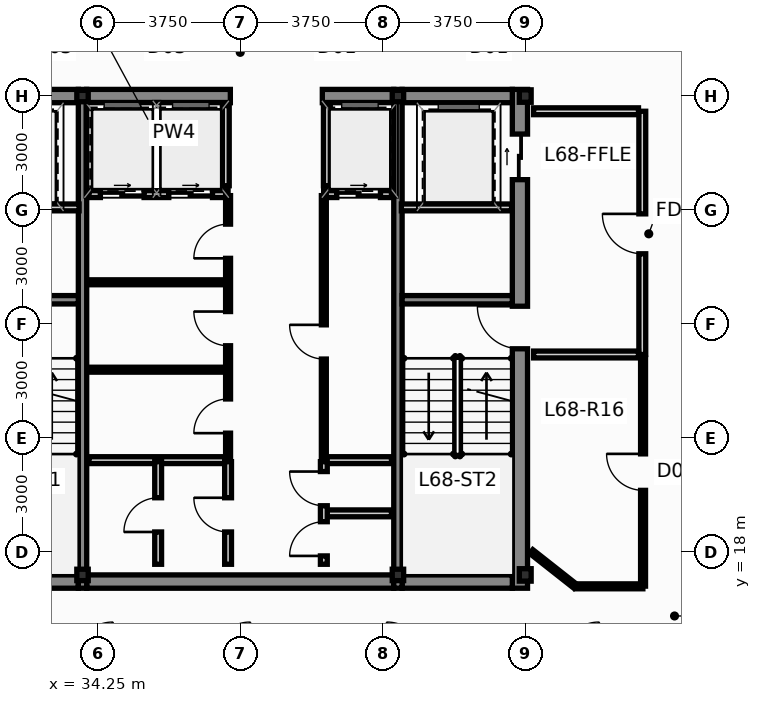
"""IFC4 building model, lengths in metres.
Left out: names, types, materials, properties, quantities, classifications, styles, units other than length and angle.
Written with IfcOpenShell. Run it as: python <this file> out.ifc"""

import sys

from ifc_helpers import new_model, si_unit, direction, frame, frame_2d, origin, origin_2d, place, context, subcontext, project, spatial, rectangle, hollow_rectangle, i_section, extrude, source, transform, mapped, element, fill, save


model = new_model("IFC4")
c1 = context("Model", 3, precision=1e-05, world=origin(), true_north=direction((0.0, 1.0)))
c2 = subcontext(c1, "Body", "Model", "MODEL_VIEW")
j1 = project(units=[si_unit("LENGTHUNIT", "METRE"), si_unit("PLANEANGLEUNIT", "RADIAN")], contexts=[c1])
p1 = place(None, origin())
s1 = spatial("IfcSite", under=j1, at=p1, CompositionType="ELEMENT")
p2 = place(p1, origin())
s2 = spatial("IfcBuilding", under=s1, at=p2, CompositionType="ELEMENT")
p3 = place(p2, frame((0.0, 0.0, 259.05)))
s3 = spatial("IfcBuildingStorey", under=s2, at=p3, CompositionType="ELEMENT", Elevation=259.05)
m1 = source(origin(), c2, "Body", "SweptSolid", [
    extrude(i_section(OverallWidth=0.311, OverallDepth=0.327, WebThickness=0.016, FlangeThickness=0.025, at=origin_2d()), origin(), (0.0, 0.0, 1.0), 3.65),
])
for number, where, z_axis, x_axis in (
    (1, (45.5, 17.4, 0.0), (0.0, 0.0, 1.0), (1.0, 0.0, 0.0)),
    (2, (45.5, 30.0, 0.0), (0.0, 0.0, 1.0), (1.0, 0.0, 0.0)),
):
    element("IfcColumn", number, at=place(p3, frame(where, z_axis=z_axis, x_axis=x_axis)), inside=s3, PredefinedType="COLUMN", context=c2, shape_type="MappedRepresentation", body=[
        mapped(m1, transform((0.0, 0.0, 0.0), scale=1.0)),
    ])
m2 = source(origin(), c2, "Body", "SweptSolid", [
    extrude(hollow_rectangle(XDim=0.3, YDim=0.3, WallThickness=0.012, at=origin_2d()), origin(), (0.0, 0.0, 1.0), 3.65),
])
for number, where, z_axis, x_axis in (
    (3, (33.85, 17.4, 0.0), (0.0, 0.0, 1.0), (1.0, 0.0, 0.0)),
    (4, (42.15, 17.4, 0.0), (0.0, 0.0, 1.0), (1.0, 0.0, 0.0)),
    (5, (33.85, 30.0, 0.0), (0.0, 0.0, 1.0), (1.0, 0.0, 0.0)),
    (6, (42.15, 30.0, 0.0), (0.0, 0.0, 1.0), (1.0, 0.0, 0.0)),
):
    element("IfcColumn", number, at=place(p3, frame(where, z_axis=z_axis, x_axis=x_axis)), inside=s3, PredefinedType="COLUMN", context=c2, shape_type="MappedRepresentation", body=[
        mapped(m2, transform((0.0, 0.0, 0.0), scale=1.0)),
    ])
p4 = place(p3, frame((45.36, 17.05, 0.0), z_axis=(0.0, 0.0, 1.0), x_axis=(0.0, 1.0, 0.0)))
e7 = element("IfcWall", 7, at=p4, inside=s3, PredefinedType="SHEAR", context=c2, shape_type="SweptSolid", body=[
    extrude(rectangle(XDim=13.125, YDim=0.4, at=frame_2d((6.562, 0.0))), origin(), (0.0, 0.0, 1.0), 3.65),
])
p5 = place(p4, frame((6.3, 0.0, 0.0)))
e8 = element("IfcOpeningElement", 8, at=p5, cuts=e7, PredefinedType="OPENING", context=c2, shape_type="SweptSolid", body=[
    extrude(rectangle(XDim=1.12, YDim=2.15, at=frame_2d((0.56, 1.075))), frame((0.0, 0.212, 0.0), z_axis=(0.0, -1.0, 0.0), x_axis=(1.0, 0.0, 0.0)), (0.0, 0.0, 1.0), 0.424),
])
p6 = place(p4, frame((10.75, 0.0, 0.0)))
e9 = element("IfcOpeningElement", 9, at=p6, cuts=e7, PredefinedType="OPENING", context=c2, shape_type="SweptSolid", body=[
    extrude(rectangle(XDim=1.2, YDim=2.2, at=frame_2d((0.6, 1.1))), frame((0.0, 0.212, 0.0), z_axis=(0.0, -1.0, 0.0), x_axis=(1.0, 0.0, 0.0)), (0.0, 0.0, 1.0), 0.424),
])
p7 = place(p3, frame((30.84, 17.225, 0.0), z_axis=(0.0, 0.0, 1.0), x_axis=(1.0, 0.0, 0.0)))
e10 = element("IfcWall", 10, at=p7, inside=s3, PredefinedType="SHEAR", context=c2, shape_type="SweptSolid", body=[
    extrude(rectangle(XDim=2.9, YDim=0.35, at=frame_2d((1.45, 0.0))), origin(), (0.0, 0.0, 1.0), 3.65),
])
p8 = place(p3, frame((33.96, 17.225, 0.0), z_axis=(0.0, 0.0, 1.0), x_axis=(1.0, 0.0, 0.0)))
e11 = element("IfcWall", 11, at=p8, inside=s3, PredefinedType="SHEAR", context=c2, shape_type="SweptSolid", body=[
    extrude(rectangle(XDim=8.08, YDim=0.35, at=frame_2d((4.04, 0.0))), origin(), (0.0, 0.0, 1.0), 3.65),
])
for number, where, z_axis, x_axis in (
    (12, (42.26, 17.225, 0.0), (0.0, 0.0, 1.0), (1.0, 0.0, 0.0)),
    (13, (30.84, 30.0, 0.0), (0.0, 0.0, 1.0), (1.0, 0.0, 0.0)),
):
    element("IfcWall", number, at=place(p3, frame(where, z_axis=z_axis, x_axis=x_axis)), inside=s3, PredefinedType="SHEAR", context=c2, shape_type="SweptSolid", body=[
        extrude(rectangle(XDim=2.9, YDim=0.35, at=frame_2d((1.45, 0.0))), origin(), (0.0, 0.0, 1.0), 3.65),
    ])
p9 = place(p3, frame((33.96, 30.0, 0.0), z_axis=(0.0, 0.0, 1.0), x_axis=(1.0, 0.0, 0.0)))
e14 = element("IfcWall", 14, at=p9, inside=s3, PredefinedType="SHEAR", context=c2, shape_type="SweptSolid", body=[
    extrude(rectangle(XDim=3.78, YDim=0.35, at=frame_2d((1.89, 0.0))), origin(), (0.0, 0.0, 1.0), 3.65),
])
p10 = place(p3, frame((40.16, 30.0, 0.0), z_axis=(0.0, 0.0, 1.0), x_axis=(1.0, 0.0, 0.0)))
e15 = element("IfcWall", 15, at=p10, inside=s3, PredefinedType="SHEAR", context=c2, shape_type="SweptSolid", body=[
    extrude(rectangle(XDim=1.88, YDim=0.35, at=frame_2d((0.94, 0.0))), origin(), (0.0, 0.0, 1.0), 3.65),
])
p11 = place(p3, frame((42.26, 30.0, 0.0), z_axis=(0.0, 0.0, 1.0), x_axis=(1.0, 0.0, 0.0)))
e16 = element("IfcWall", 16, at=p11, inside=s3, PredefinedType="SHEAR", context=c2, shape_type="SweptSolid", body=[
    extrude(rectangle(XDim=2.9, YDim=0.35, at=frame_2d((1.45, 0.0))), origin(), (0.0, 0.0, 1.0), 3.65),
])
for number, where, z_axis, x_axis in (
    (17, (33.85, 17.05, 0.0), (0.0, 0.0, 1.0), (0.0, 1.0, 0.0)),
    (18, (42.15, 17.05, 0.0), (0.0, 0.0, 1.0), (0.0, 1.0, 0.0)),
):
    element("IfcWall", number, at=place(p3, frame(where, z_axis=z_axis, x_axis=x_axis)), inside=s3, PredefinedType="SHEAR", context=c2, shape_type="SweptSolid", body=[
        extrude(rectangle(XDim=13.125, YDim=0.22, at=frame_2d((6.562, 0.0))), origin(), (0.0, 0.0, 1.0), 3.65),
    ])
for number, where, z_axis, x_axis in (
    (19, (30.84, 24.64, 0.0), (0.0, 0.0, 1.0), (1.0, 0.0, 0.0)),
    (20, (42.26, 24.64, 0.0), (0.0, 0.0, 1.0), (1.0, 0.0, 0.0)),
):
    element("IfcWall", number, at=place(p3, frame(where, z_axis=z_axis, x_axis=x_axis)), inside=s3, PredefinedType="SHEAR", context=c2, shape_type="SweptSolid", body=[
        extrude(rectangle(XDim=2.9, YDim=0.22, at=frame_2d((1.45, 0.0))), origin(), (0.0, 0.0, 1.0), 3.65),
    ])
p12 = place(p3, frame((34.02, 27.42, 0.0), z_axis=(0.0, 0.0, 1.0), x_axis=(1.0, 0.0, 0.0)))
e21 = element("IfcWall", 21, at=p12, inside=s3, PredefinedType="PARTITIONING", context=c2, shape_type="SweptSolid", body=[
    extrude(rectangle(XDim=3.66, YDim=0.18, at=frame_2d((1.83, 0.0))), origin(), (0.0, 0.0, 1.0), 3.4),
])
p13 = place(p12, frame((0.3, 0.0, 0.0)))
e22 = element("IfcOpeningElement", 22, at=p13, cuts=e21, PredefinedType="OPENING", context=c2, shape_type="SweptSolid", body=[
    extrude(rectangle(XDim=1.15, YDim=2.2, at=frame_2d((0.575, 1.1))), frame((0.0, 0.102, 0.0), z_axis=(0.0, -1.0, 0.0), x_axis=(1.0, 0.0, 0.0)), (0.0, 0.0, 1.0), 0.204),
])
p14 = place(p12, frame((2.1, 0.0, 0.0)))
e23 = element("IfcOpeningElement", 23, at=p14, cuts=e21, PredefinedType="OPENING", context=c2, shape_type="SweptSolid", body=[
    extrude(rectangle(XDim=1.15, YDim=2.2, at=frame_2d((0.575, 1.1))), frame((0.0, 0.102, 0.0), z_axis=(0.0, -1.0, 0.0), x_axis=(1.0, 0.0, 0.0)), (0.0, 0.0, 1.0), 0.204),
])
p15 = place(p3, frame((40.22, 27.42, 0.0), z_axis=(0.0, 0.0, 1.0), x_axis=(1.0, 0.0, 0.0)))
e24 = element("IfcWall", 24, at=p15, inside=s3, PredefinedType="PARTITIONING", context=c2, shape_type="SweptSolid", body=[
    extrude(rectangle(XDim=1.76, YDim=0.18, at=frame_2d((0.88, 0.0))), origin(), (0.0, 0.0, 1.0), 3.4),
])
p16 = place(p15, frame((0.32, 0.0, 0.0)))
e25 = element("IfcOpeningElement", 25, at=p16, cuts=e24, PredefinedType="OPENING", context=c2, shape_type="SweptSolid", body=[
    extrude(rectangle(XDim=1.15, YDim=2.2, at=frame_2d((0.575, 1.1))), frame((0.0, 0.102, 0.0), z_axis=(0.0, -1.0, 0.0), x_axis=(1.0, 0.0, 0.0)), (0.0, 0.0, 1.0), 0.204),
])
for number, where, z_axis, x_axis in (
    (26, (37.62, 27.64, 0.0), (0.0, 0.0, 1.0), (0.0, 1.0, 0.0)),
    (27, (40.28, 27.64, 0.0), (0.0, 0.0, 1.0), (0.0, 1.0, 0.0)),
):
    element("IfcWall", number, at=place(p3, frame(where, z_axis=z_axis, x_axis=x_axis)), inside=s3, PredefinedType="PARTITIONING", context=c2, shape_type="SweptSolid", body=[
        extrude(rectangle(XDim=2.11, YDim=0.18, at=frame_2d((1.055, 0.0))), origin(), (0.0, 0.0, 1.0), 3.4),
    ])
p17 = place(p3, frame((48.58, 23.2, 0.0), z_axis=(0.0, 0.0, 1.0), x_axis=(0.0, 1.0, 0.0)))
e28 = element("IfcWall", 28, at=p17, inside=s3, PredefinedType="PARTITIONING", context=c2, shape_type="SweptSolid", body=[
    extrude(rectangle(XDim=6.4, YDim=0.18, at=frame_2d((3.2, 0.0))), origin(), (0.0, 0.0, 1.0), 3.129),
])
p18 = place(p17, frame((2.65, 0.0, 0.0)))
e29 = element("IfcOpeningElement", 29, at=p18, cuts=e28, PredefinedType="OPENING", context=c2, shape_type="SweptSolid", body=[
    extrude(rectangle(XDim=1.05, YDim=2.15, at=frame_2d((0.525, 1.075))), frame((0.0, 0.102, 0.0), z_axis=(0.0, -1.0, 0.0), x_axis=(1.0, 0.0, 0.0)), (0.0, 0.0, 1.0), 0.204),
])
for number, where, z_axis, x_axis in (
    (30, (45.72, 23.2, 0.0), (0.0, 0.0, 1.0), (1.0, 0.0, 0.0)),
    (31, (45.72, 29.6, 0.0), (0.0, 0.0, 1.0), (1.0, 0.0, 0.0)),
):
    element("IfcWall", number, at=place(p3, frame(where, z_axis=z_axis, x_axis=x_axis)), inside=s3, PredefinedType="PARTITIONING", context=c2, shape_type="SweptSolid", body=[
        extrude(rectangle(XDim=2.76, YDim=0.18, at=frame_2d((1.38, 0.0))), origin(), (0.0, 0.0, 1.0), 3.4),
    ])
for number, where, z_axis, x_axis in (
    (32, (30.86, 27.07, 0.0), (0.0, 0.0, 1.0), (1.0, 0.0, 0.0)),
    (33, (42.24, 27.07, 0.0), (0.0, 0.0, 1.0), (1.0, 0.0, 0.0)),
):
    element("IfcWall", number, at=place(p3, frame(where, z_axis=z_axis, x_axis=x_axis)), inside=s3, PredefinedType="PARTITIONING", context=c2, shape_type="SweptSolid", body=[
        extrude(rectangle(XDim=2.9, YDim=0.18, at=frame_2d((1.45, 0.0))), origin(), (0.0, 0.0, 1.0), 3.4),
    ])
p19 = place(p3, frame((34.02, 20.42, 0.0), z_axis=(0.0, 0.0, 1.0), x_axis=(1.0, 0.0, 0.0)))
e34 = element("IfcWall", 34, at=p19, inside=s3, PredefinedType="PARTITIONING", context=c2, shape_type="SweptSolid", body=[
    extrude(rectangle(XDim=3.64, YDim=0.18, at=frame_2d((1.82, 0.0))), origin(), (0.0, 0.0, 1.0), 3.4),
])
p20 = place(p3, frame((40.22, 20.42, 0.0), z_axis=(0.0, 0.0, 1.0), x_axis=(1.0, 0.0, 0.0)))
e35 = element("IfcWall", 35, at=p20, inside=s3, PredefinedType="PARTITIONING", context=c2, shape_type="SweptSolid", body=[
    extrude(rectangle(XDim=1.76, YDim=0.18, at=frame_2d((0.88, 0.0))), origin(), (0.0, 0.0, 1.0), 3.4),
])
for number, where, z_axis, x_axis in (
    (36, (34.02, 22.8, 0.0), (0.0, 0.0, 1.0), (1.0, 0.0, 0.0)),
    (37, (34.02, 25.1, 0.0), (0.0, 0.0, 1.0), (1.0, 0.0, 0.0)),
):
    element("IfcWall", number, at=place(p3, frame(where, z_axis=z_axis, x_axis=x_axis)), inside=s3, PredefinedType="PARTITIONING", context=c2, shape_type="SweptSolid", body=[
        extrude(rectangle(XDim=3.58, YDim=0.13, at=frame_2d((1.79, 0.0))), origin(), (0.0, 0.0, 1.0), 3.4),
    ])
p21 = place(p3, frame((37.68, 20.48, 0.0), z_axis=(0.0, 0.0, 1.0), x_axis=(0.0, 1.0, 0.0)))
e38 = element("IfcWall", 38, at=p21, inside=s3, PredefinedType="PARTITIONING", context=c2, shape_type="SweptSolid", body=[
    extrude(rectangle(XDim=6.9, YDim=0.13, at=frame_2d((3.45, 0.0))), origin(), (0.0, 0.0, 1.0), 3.4),
])
p22 = place(p21, frame((0.65, 0.0, 0.0)))
e39 = element("IfcOpeningElement", 39, at=p22, cuts=e38, PredefinedType="OPENING", context=c2, shape_type="SweptSolid", body=[
    extrude(rectangle(XDim=0.9, YDim=2.1, at=frame_2d((0.45, 1.05))), frame((0.0, 0.077, 0.0), z_axis=(0.0, -1.0, 0.0), x_axis=(1.0, 0.0, 0.0)), (0.0, 0.0, 1.0), 0.154),
])
p23 = place(p21, frame((2.95, 0.0, 0.0)))
e40 = element("IfcOpeningElement", 40, at=p23, cuts=e38, PredefinedType="OPENING", context=c2, shape_type="SweptSolid", body=[
    extrude(rectangle(XDim=0.9, YDim=2.1, at=frame_2d((0.45, 1.05))), frame((0.0, 0.077, 0.0), z_axis=(0.0, -1.0, 0.0), x_axis=(1.0, 0.0, 0.0)), (0.0, 0.0, 1.0), 0.154),
])
p24 = place(p21, frame((5.25, 0.0, 0.0)))
e41 = element("IfcOpeningElement", 41, at=p24, cuts=e38, PredefinedType="OPENING", context=c2, shape_type="SweptSolid", body=[
    extrude(rectangle(XDim=0.9, YDim=2.1, at=frame_2d((0.45, 1.05))), frame((0.0, 0.077, 0.0), z_axis=(0.0, -1.0, 0.0), x_axis=(1.0, 0.0, 0.0)), (0.0, 0.0, 1.0), 0.154),
])
p25 = place(p3, frame((40.2, 20.48, 0.0), z_axis=(0.0, 0.0, 1.0), x_axis=(0.0, 1.0, 0.0)))
e42 = element("IfcWall", 42, at=p25, inside=s3, PredefinedType="PARTITIONING", context=c2, shape_type="SweptSolid", body=[
    extrude(rectangle(XDim=6.9, YDim=0.13, at=frame_2d((3.45, 0.0))), origin(), (0.0, 0.0, 1.0), 3.4),
])
p26 = place(p25, frame((2.6, 0.0, 0.0)))
e43 = element("IfcOpeningElement", 43, at=p26, cuts=e42, PredefinedType="OPENING", context=c2, shape_type="SweptSolid", body=[
    extrude(rectangle(XDim=0.9, YDim=2.1, at=frame_2d((0.45, 1.05))), frame((0.0, 0.077, 0.0), z_axis=(0.0, -1.0, 0.0), x_axis=(1.0, 0.0, 0.0)), (0.0, 0.0, 1.0), 0.154),
])
p27 = place(p3, frame((35.84, 17.68, 0.0), z_axis=(0.0, 0.0, 1.0), x_axis=(0.0, 1.0, 0.0)))
e44 = element("IfcWall", 44, at=p27, inside=s3, PredefinedType="PARTITIONING", context=c2, shape_type="SweptSolid", body=[
    extrude(rectangle(XDim=2.7, YDim=0.18, at=frame_2d((1.35, 0.0))), origin(), (0.0, 0.0, 1.0), 3.4),
])
p28 = place(p27, frame((0.85, 0.0, 0.0)))
e45 = element("IfcOpeningElement", 45, at=p28, cuts=e44, PredefinedType="OPENING", context=c2, shape_type="SweptSolid", body=[
    extrude(rectangle(XDim=0.9, YDim=2.1, at=frame_2d((0.45, 1.05))), frame((0.0, 0.102, 0.0), z_axis=(0.0, -1.0, 0.0), x_axis=(1.0, 0.0, 0.0)), (0.0, 0.0, 1.0), 0.204),
])
p29 = place(p3, frame((37.68, 17.68, 0.0), z_axis=(0.0, 0.0, 1.0), x_axis=(0.0, 1.0, 0.0)))
e46 = element("IfcWall", 46, at=p29, inside=s3, PredefinedType="PARTITIONING", context=c2, shape_type="SweptSolid", body=[
    extrude(rectangle(XDim=2.7, YDim=0.18, at=frame_2d((1.35, 0.0))), origin(), (0.0, 0.0, 1.0), 3.4),
])
p30 = place(p29, frame((0.85, 0.0, 0.0)))
e47 = element("IfcOpeningElement", 47, at=p30, cuts=e46, PredefinedType="OPENING", context=c2, shape_type="SweptSolid", body=[
    extrude(rectangle(XDim=0.9, YDim=2.1, at=frame_2d((0.45, 1.05))), frame((0.0, 0.102, 0.0), z_axis=(0.0, -1.0, 0.0), x_axis=(1.0, 0.0, 0.0)), (0.0, 0.0, 1.0), 0.204),
])
p31 = place(p3, frame((40.28, 19.02, 0.0), z_axis=(0.0, 0.0, 1.0), x_axis=(1.0, 0.0, 0.0)))
e48 = element("IfcWall", 48, at=p31, inside=s3, PredefinedType="PARTITIONING", context=c2, shape_type="SweptSolid", body=[
    extrude(rectangle(XDim=1.7, YDim=0.18, at=frame_2d((0.85, 0.0))), origin(), (0.0, 0.0, 1.0), 3.4),
])
p32 = place(p3, frame((40.2, 17.68, 0.0), z_axis=(0.0, 0.0, 1.0), x_axis=(0.0, 1.0, 0.0)))
e49 = element("IfcWall", 49, at=p32, inside=s3, PredefinedType="PARTITIONING", context=c2, shape_type="SweptSolid", body=[
    extrude(rectangle(XDim=2.7, YDim=0.18, at=frame_2d((1.35, 0.0))), origin(), (0.0, 0.0, 1.0), 3.4),
])
p33 = place(p32, frame((0.22, 0.0, 0.0)))
e50 = element("IfcOpeningElement", 50, at=p33, cuts=e49, PredefinedType="OPENING", context=c2, shape_type="SweptSolid", body=[
    extrude(rectangle(XDim=0.9, YDim=2.1, at=frame_2d((0.45, 1.05))), frame((0.0, 0.102, 0.0), z_axis=(0.0, -1.0, 0.0), x_axis=(1.0, 0.0, 0.0)), (0.0, 0.0, 1.0), 0.204),
])
p34 = place(p32, frame((1.54, 0.0, 0.0)))
e51 = element("IfcOpeningElement", 51, at=p34, cuts=e49, PredefinedType="OPENING", context=c2, shape_type="SweptSolid", body=[
    extrude(rectangle(XDim=0.9, YDim=2.1, at=frame_2d((0.45, 1.05))), frame((0.0, 0.102, 0.0), z_axis=(0.0, -1.0, 0.0), x_axis=(1.0, 0.0, 0.0)), (0.0, 0.0, 1.0), 0.204),
])
p35 = place(p3, frame((48.6, 17.105, 0.0), z_axis=(0.0, 0.0, 1.0), x_axis=(0.0, 1.0, 0.0)))
e52 = element("IfcWall", 52, at=p35, inside=s3, PredefinedType="PARTITIONING", context=c2, shape_type="SweptSolid", body=[
    extrude(rectangle(XDim=6.0, YDim=0.13, at=frame_2d((3.0, 0.0))), origin(), (0.0, 0.0, 1.0), 3.129),
])
p36 = place(p35, frame((2.52, 0.0, 0.0)))
e53 = element("IfcOpeningElement", 53, at=p36, cuts=e52, PredefinedType="OPENING", context=c2, shape_type="SweptSolid", body=[
    extrude(rectangle(XDim=0.96, YDim=2.15, at=frame_2d((0.48, 1.075))), frame((0.0, 0.077, 0.0), z_axis=(0.0, -1.0, 0.0), x_axis=(1.0, 0.0, 0.0)), (0.0, 0.0, 1.0), 0.154),
])
p37 = place(p3, frame((46.825, 17.1, 0.0), z_axis=(0.0, 0.0, 1.0), x_axis=(1.0, 0.0, 0.0)))
e54 = element("IfcWall", 54, at=p37, inside=s3, PredefinedType="PARTITIONING", context=c2, shape_type="SweptSolid", body=[
    extrude(rectangle(XDim=1.77, YDim=0.13, at=frame_2d((0.885, 0.0))), origin(), (0.0, 0.0, 1.0), 2.985),
])
p38 = place(p3, frame((46.816, 17.103, 0.0), z_axis=(0.0, 0.0, 1.0), x_axis=(-0.785713874632, 0.618590096276, 0.0)))
e55 = element("IfcWall", 55, at=p38, inside=s3, PredefinedType="PARTITIONING", context=c2, shape_type="SweptSolid", body=[
    extrude(rectangle(XDim=1.472, YDim=0.13, at=frame_2d((0.736, 0.0))), origin(), (0.0, 0.0, 1.0), 3.4),
])
p39 = place(p5, origin())
e56 = element("IfcDoor", 56, at=p39, inside=s3, OperationType="SINGLE_SWING_RIGHT", PredefinedType="DOOR", context=c2, shape_type="SweptSolid", body=[
    extrude(rectangle(XDim=1.12, YDim=2.15, at=frame_2d((0.56, 1.075))), frame((0.0, 0.025, 0.0), z_axis=(0.0, -1.0, 0.0), x_axis=(1.0, 0.0, 0.0)), (0.0, 0.0, 1.0), 0.05),
])
fill(e8, e56)
p40 = place(p6, origin())
e57 = element("IfcDoor", 57, at=p40, inside=s3, OperationType="SLIDING_TO_RIGHT", PredefinedType="DOOR", context=c2, shape_type="SweptSolid", body=[
    extrude(rectangle(XDim=1.2, YDim=2.2, at=frame_2d((0.6, 1.1))), frame((0.0, 0.025, 0.0), z_axis=(0.0, -1.0, 0.0), x_axis=(1.0, 0.0, 0.0)), (0.0, 0.0, 1.0), 0.05),
])
fill(e9, e57)
p41 = place(p13, origin())
e58 = element("IfcDoor", 58, at=p41, inside=s3, OperationType="SLIDING_TO_RIGHT", PredefinedType="DOOR", context=c2, shape_type="SweptSolid", body=[
    extrude(rectangle(XDim=1.15, YDim=2.2, at=frame_2d((0.575, 1.1))), frame((0.0, 0.025, 0.0), z_axis=(0.0, -1.0, 0.0), x_axis=(1.0, 0.0, 0.0)), (0.0, 0.0, 1.0), 0.05),
])
fill(e22, e58)
p42 = place(p14, origin())
e59 = element("IfcDoor", 59, at=p42, inside=s3, OperationType="SLIDING_TO_LEFT", PredefinedType="DOOR", context=c2, shape_type="SweptSolid", body=[
    extrude(rectangle(XDim=1.15, YDim=2.2, at=frame_2d((0.575, 1.1))), frame((0.0, 0.025, 0.0), z_axis=(0.0, -1.0, 0.0), x_axis=(1.0, 0.0, 0.0)), (0.0, 0.0, 1.0), 0.05),
])
fill(e23, e59)
p43 = place(p16, origin())
e60 = element("IfcDoor", 60, at=p43, inside=s3, OperationType="SLIDING_TO_RIGHT", PredefinedType="DOOR", context=c2, shape_type="SweptSolid", body=[
    extrude(rectangle(XDim=1.15, YDim=2.2, at=frame_2d((0.575, 1.1))), frame((0.0, 0.025, 0.0), z_axis=(0.0, -1.0, 0.0), x_axis=(1.0, 0.0, 0.0)), (0.0, 0.0, 1.0), 0.05),
])
fill(e25, e60)
p44 = place(p18, origin())
e61 = element("IfcDoor", 61, at=p44, inside=s3, OperationType="SINGLE_SWING_RIGHT", PredefinedType="DOOR", context=c2, shape_type="SweptSolid", body=[
    extrude(rectangle(XDim=1.05, YDim=2.15, at=frame_2d((0.525, 1.075))), frame((0.0, 0.025, 0.0), z_axis=(0.0, -1.0, 0.0), x_axis=(1.0, 0.0, 0.0)), (0.0, 0.0, 1.0), 0.05),
])
fill(e29, e61)
p45 = place(p22, origin())
e62 = element("IfcDoor", 62, at=p45, inside=s3, OperationType="SINGLE_SWING_LEFT", PredefinedType="DOOR", context=c2, shape_type="SweptSolid", body=[
    extrude(rectangle(XDim=0.9, YDim=2.1, at=frame_2d((0.45, 1.05))), frame((0.0, 0.025, 0.0), z_axis=(0.0, -1.0, 0.0), x_axis=(1.0, 0.0, 0.0)), (0.0, 0.0, 1.0), 0.05),
])
fill(e39, e62)
p46 = place(p23, origin())
e63 = element("IfcDoor", 63, at=p46, inside=s3, OperationType="SINGLE_SWING_RIGHT", PredefinedType="DOOR", context=c2, shape_type="SweptSolid", body=[
    extrude(rectangle(XDim=0.9, YDim=2.1, at=frame_2d((0.45, 1.05))), frame((0.0, 0.025, 0.0), z_axis=(0.0, -1.0, 0.0), x_axis=(1.0, 0.0, 0.0)), (0.0, 0.0, 1.0), 0.05),
])
fill(e40, e63)
p47 = place(p24, origin())
e64 = element("IfcDoor", 64, at=p47, inside=s3, OperationType="SINGLE_SWING_LEFT", PredefinedType="DOOR", context=c2, shape_type="SweptSolid", body=[
    extrude(rectangle(XDim=0.9, YDim=2.1, at=frame_2d((0.45, 1.05))), frame((0.0, 0.025, 0.0), z_axis=(0.0, -1.0, 0.0), x_axis=(1.0, 0.0, 0.0)), (0.0, 0.0, 1.0), 0.05),
])
fill(e41, e64)
p48 = place(p26, origin())
e65 = element("IfcDoor", 65, at=p48, inside=s3, OperationType="SINGLE_SWING_RIGHT", PredefinedType="DOOR", context=c2, shape_type="SweptSolid", body=[
    extrude(rectangle(XDim=0.9, YDim=2.1, at=frame_2d((0.45, 1.05))), frame((0.0, 0.025, 0.0), z_axis=(0.0, -1.0, 0.0), x_axis=(1.0, 0.0, 0.0)), (0.0, 0.0, 1.0), 0.05),
])
fill(e43, e65)
p49 = place(p28, origin())
e66 = element("IfcDoor", 66, at=p49, inside=s3, OperationType="SINGLE_SWING_LEFT", PredefinedType="DOOR", context=c2, shape_type="SweptSolid", body=[
    extrude(rectangle(XDim=0.9, YDim=2.1, at=frame_2d((0.45, 1.05))), frame((0.0, 0.025, 0.0), z_axis=(0.0, -1.0, 0.0), x_axis=(1.0, 0.0, 0.0)), (0.0, 0.0, 1.0), 0.05),
])
fill(e45, e66)
p50 = place(p30, origin())
e67 = element("IfcDoor", 67, at=p50, inside=s3, OperationType="SINGLE_SWING_RIGHT", PredefinedType="DOOR", context=c2, shape_type="SweptSolid", body=[
    extrude(rectangle(XDim=0.9, YDim=2.1, at=frame_2d((0.45, 1.05))), frame((0.0, 0.025, 0.0), z_axis=(0.0, -1.0, 0.0), x_axis=(1.0, 0.0, 0.0)), (0.0, 0.0, 1.0), 0.05),
])
fill(e47, e67)
p51 = place(p33, origin())
e68 = element("IfcDoor", 68, at=p51, inside=s3, OperationType="SINGLE_SWING_LEFT", PredefinedType="DOOR", context=c2, shape_type="SweptSolid", body=[
    extrude(rectangle(XDim=0.9, YDim=2.1, at=frame_2d((0.45, 1.05))), frame((0.0, 0.025, 0.0), z_axis=(0.0, -1.0, 0.0), x_axis=(1.0, 0.0, 0.0)), (0.0, 0.0, 1.0), 0.05),
])
fill(e50, e68)
p52 = place(p34, origin())
e69 = element("IfcDoor", 69, at=p52, inside=s3, OperationType="SINGLE_SWING_RIGHT", PredefinedType="DOOR", context=c2, shape_type="SweptSolid", body=[
    extrude(rectangle(XDim=0.9, YDim=2.1, at=frame_2d((0.45, 1.05))), frame((0.0, 0.025, 0.0), z_axis=(0.0, -1.0, 0.0), x_axis=(1.0, 0.0, 0.0)), (0.0, 0.0, 1.0), 0.05),
])
fill(e51, e69)
p53 = place(p36, origin())
e70 = element("IfcDoor", 70, at=p53, inside=s3, OperationType="SINGLE_SWING_RIGHT", PredefinedType="DOOR", context=c2, shape_type="SweptSolid", body=[
    extrude(rectangle(XDim=0.96, YDim=2.15, at=frame_2d((0.48, 1.075))), frame((0.0, 0.025, 0.0), z_axis=(0.0, -1.0, 0.0), x_axis=(1.0, 0.0, 0.0)), (0.0, 0.0, 1.0), 0.05),
])
fill(e53, e70)
save(model, sys.argv[1])
